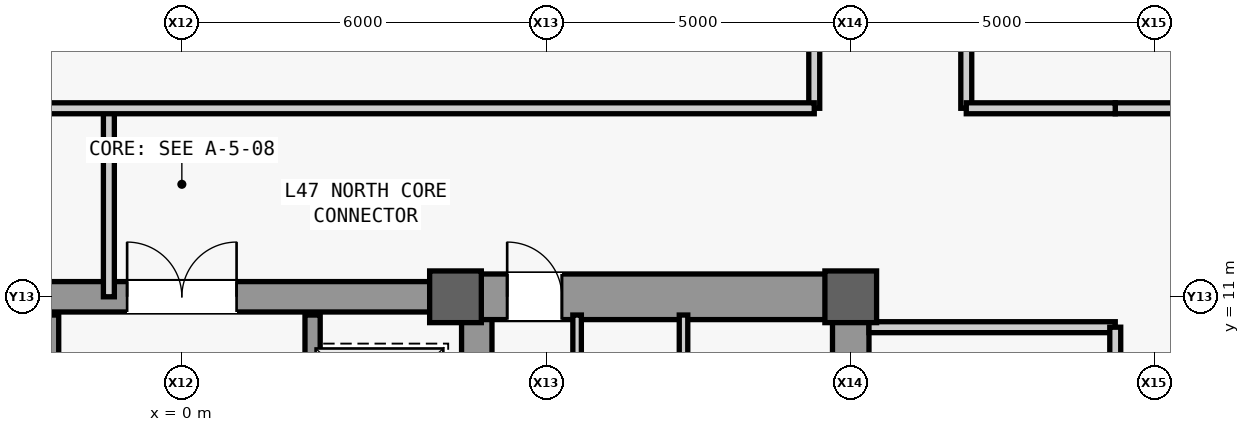
"""IFC4 building model, lengths in metres.
Left out: names, types, materials, properties, quantities, classifications, styles, units other than length and angle.
Written with IfcOpenShell. Run it as: python <this file> out.ifc"""

import sys

from ifc_helpers import new_model, si_unit, direction, frame, frame_2d, origin, origin_2d, place, context, subcontext, project, spatial, rectangle, extrude, source, transform, mapped, element, fill, save


model = new_model("IFC4")
c1 = context("Model", 3, precision=1e-05, world=origin(), true_north=direction((0.0, 1.0)))
c2 = subcontext(c1, "Body", "Model", "MODEL_VIEW")
j1 = project(units=[si_unit("LENGTHUNIT", "METRE"), si_unit("PLANEANGLEUNIT", "RADIAN")], contexts=[c1])
p1 = place(None, origin())
s1 = spatial("IfcSite", under=j1, at=p1, CompositionType="ELEMENT")
p2 = place(p1, origin())
s2 = spatial("IfcBuilding", under=s1, at=p2, CompositionType="ELEMENT")
p3 = place(p2, frame((0.0, 0.0, 203.1)))
s3 = spatial("IfcBuildingStorey", under=s2, at=p3, CompositionType="ELEMENT", Elevation=203.1)
m1 = source(origin(), c2, "Body", "SweptSolid", [
    extrude(rectangle(XDim=22.0, YDim=0.6, at=frame_2d((11.0, 0.0))), origin(), (0.0, 0.0, 1.0), 3.78),
])
p4 = place(p3, frame((11.0, -11.0, 0.0), z_axis=(0.0, 0.0, 1.0), x_axis=(0.0, 1.0, 0.0)))
e1 = element("IfcWall", 1, at=p4, inside=s3, PredefinedType="SHEAR", context=c2, shape_type="MappedRepresentation", body=[
    mapped(m1, transform((0.0, 0.0, 0.0), scale=1.0)),
])
m2 = source(origin(), c2, "Body", "SweptSolid", [
    extrude(rectangle(XDim=1.1, YDim=2.2, at=frame_2d((0.55, 1.1))), frame((0.0, 0.31, 0.0), z_axis=(0.0, -1.0, 0.0), x_axis=(1.0, 0.0, 0.0)), (0.0, 0.0, 1.0), 0.62),
])
p5 = place(p4, frame((0.8, 0.0, 0.0)))
e2 = element("IfcOpeningElement", 2, at=p5, cuts=e1, PredefinedType="OPENING", context=c2, shape_type="MappedRepresentation", body=[
    mapped(m2, transform((0.0, 0.0, 0.0), scale=1.0)),
])
m3 = source(origin(), c2, "Body", "SweptSolid", [
    extrude(rectangle(XDim=0.9, YDim=2.15, at=frame_2d((0.45, 1.075))), frame((0.0, 0.31, 0.0), z_axis=(0.0, -1.0, 0.0), x_axis=(1.0, 0.0, 0.0)), (0.0, 0.0, 1.0), 0.62),
])
p6 = place(p4, frame((7.575, 0.0, 0.0)))
e3 = element("IfcOpeningElement", 3, at=p6, cuts=e1, PredefinedType="OPENING", context=c2, shape_type="MappedRepresentation", body=[
    mapped(m3, transform((0.0, 0.0, 0.0), scale=1.0)),
])
m4 = source(origin(), c2, "Body", "SweptSolid", [
    extrude(rectangle(XDim=1.3, YDim=2.3, at=frame_2d((0.65, 1.15))), frame((0.0, 0.31, 0.0), z_axis=(0.0, -1.0, 0.0), x_axis=(1.0, 0.0, 0.0)), (0.0, 0.0, 1.0), 0.62),
])
p7 = place(p4, frame((2.7, 0.0, 0.0)))
e4 = element("IfcOpeningElement", 4, at=p7, cuts=e1, PredefinedType="OPENING", context=c2, shape_type="MappedRepresentation", body=[
    mapped(m4, transform((0.0, 0.0, 0.0), scale=1.0)),
])
p8 = place(p4, frame((13.35, 0.0, 0.0)))
e5 = element("IfcOpeningElement", 5, at=p8, cuts=e1, PredefinedType="OPENING", context=c2, shape_type="MappedRepresentation", body=[
    mapped(m4, transform((0.0, 0.0, 0.0), scale=1.0)),
])
m5 = source(origin(), c2, "Body", "SweptSolid", [
    extrude(rectangle(XDim=21.4, YDim=0.5, at=frame_2d((10.7, 0.0))), origin(), (0.0, 0.0, 1.0), 3.78),
])
p9 = place(p3, frame((4.85, -10.7, 0.0), z_axis=(0.0, 0.0, 1.0), x_axis=(0.0, 1.0, 0.0)))
e6 = element("IfcWall", 6, at=p9, inside=s3, PredefinedType="SHEAR", context=c2, shape_type="MappedRepresentation", body=[
    mapped(m5, transform((0.0, 0.0, 0.0), scale=1.0)),
])
m6 = source(origin(), c2, "Body", "SweptSolid", [
    extrude(rectangle(XDim=5.85, YDim=0.75, at=frame_2d((2.925, 0.0))), origin(), (0.0, 0.0, 1.0), 3.78),
])
p10 = place(p3, frame((4.85, 11.0, 0.0), z_axis=(0.0, 0.0, 1.0), x_axis=(1.0, 0.0, 0.0)))
e7 = element("IfcWall", 7, at=p10, inside=s3, PredefinedType="SHEAR", context=c2, shape_type="MappedRepresentation", body=[
    mapped(m6, transform((0.0, 0.0, 0.0), scale=1.0)),
])
m7 = source(origin(), c2, "Body", "SweptSolid", [
    extrude(rectangle(XDim=0.9, YDim=2.15, at=frame_2d((0.45, 1.075))), frame((0.0, 0.385, 0.0), z_axis=(0.0, -1.0, 0.0), x_axis=(1.0, 0.0, 0.0)), (0.0, 0.0, 1.0), 0.77),
])
p11 = place(p10, frame((0.5, 0.0, 0.0)))
e8 = element("IfcOpeningElement", 8, at=p11, cuts=e7, PredefinedType="OPENING", context=c2, shape_type="MappedRepresentation", body=[
    mapped(m7, transform((0.0, 0.0, 0.0), scale=1.0)),
])
m8 = source(origin(), c2, "Body", "SweptSolid", [
    extrude(rectangle(XDim=9.2, YDim=0.5, at=frame_2d((4.6, 0.0))), origin(), (0.0, 0.0, 1.0), 3.78),
])
p12 = place(p3, frame((-4.6, 11.0, 0.0), z_axis=(0.0, 0.0, 1.0), x_axis=(1.0, 0.0, 0.0)))
e9 = element("IfcWall", 9, at=p12, inside=s3, PredefinedType="SHEAR", context=c2, shape_type="MappedRepresentation", body=[
    mapped(m8, transform((0.0, 0.0, 0.0), scale=1.0)),
])
m9 = source(origin(), c2, "Body", "SweptSolid", [
    extrude(rectangle(XDim=1.8, YDim=2.25, at=frame_2d((0.9, 1.125))), frame((0.0, 0.26, 0.0), z_axis=(0.0, -1.0, 0.0), x_axis=(1.0, 0.0, 0.0)), (0.0, 0.0, 1.0), 0.52),
])
p13 = place(p12, frame((3.7, 0.0, 0.0)))
e10 = element("IfcOpeningElement", 10, at=p13, cuts=e9, PredefinedType="OPENING", context=c2, shape_type="MappedRepresentation", body=[
    mapped(m9, transform((0.0, 0.0, 0.0), scale=1.0)),
])
m10 = source(origin(), c2, "Body", "SweptSolid", [
    extrude(rectangle(XDim=0.85, YDim=0.85, at=origin_2d()), origin(), (0.0, 0.0, 1.0), 4.0),
])
for number, where, z_axis, x_axis in (
    (11, (4.5, 11.0, 0.0), (0.0, 0.0, 1.0), (1.0, 0.0, 0.0)),
    (12, (11.0, 11.0, 0.0), (0.0, 0.0, 1.0), (1.0, 0.0, 0.0)),
):
    element("IfcColumn", number, at=place(p3, frame(where, z_axis=z_axis, x_axis=x_axis)), inside=s3, PredefinedType="COLUMN", context=c2, shape_type="MappedRepresentation", body=[
        mapped(m10, transform((0.0, 0.0, 0.0), scale=1.0)),
    ])
m11 = source(origin(), c2, "Body", "SweptSolid", [
    extrude(rectangle(XDim=9.4, YDim=0.14, at=frame_2d((4.7, 0.0))), origin(), (0.0, 0.0, 1.0), 3.78),
])
p14 = place(p3, frame((8.25, 1.3, 0.0), z_axis=(0.0, 0.0, 1.0), x_axis=(0.0, 1.0, 0.0)))
e13 = element("IfcWall", 13, at=p14, inside=s3, PredefinedType="PARTITIONING", context=c2, shape_type="MappedRepresentation", body=[
    mapped(m11, transform((0.0, 0.0, 0.0), scale=1.0)),
])
m12 = source(origin(), c2, "Body", "SweptSolid", [
    extrude(rectangle(XDim=5.7, YDim=0.14, at=frame_2d((2.85, 0.0))), origin(), (0.0, 0.0, 1.0), 3.78),
])
p15 = place(p3, frame((6.5, 5.0, 0.0), z_axis=(0.0, 0.0, 1.0), x_axis=(0.0, 1.0, 0.0)))
e14 = element("IfcWall", 14, at=p15, inside=s3, PredefinedType="PARTITIONING", context=c2, shape_type="MappedRepresentation", body=[
    mapped(m12, transform((0.0, 0.0, 0.0), scale=1.0)),
])
m13 = source(origin(), c2, "Body", "SweptSolid", [
    extrude(rectangle(XDim=0.9, YDim=2.15, at=frame_2d((0.45, 1.075))), frame((0.0, 0.08, 0.0), z_axis=(0.0, -1.0, 0.0), x_axis=(1.0, 0.0, 0.0)), (0.0, 0.0, 1.0), 0.16),
])
p16 = place(p15, frame((2.05, 0.0, 0.0)))
e15 = element("IfcOpeningElement", 15, at=p16, cuts=e14, PredefinedType="OPENING", context=c2, shape_type="MappedRepresentation", body=[
    mapped(m13, transform((0.0, 0.0, 0.0), scale=1.0)),
])
m14 = source(origin(), c2, "Body", "SweptSolid", [
    extrude(rectangle(XDim=4.05, YDim=0.18, at=frame_2d((2.025, 0.0))), origin(), (0.0, 0.0, 1.0), 3.78),
])
p17 = place(p3, frame((11.3, 10.5, 0.0), z_axis=(0.0, 0.0, 1.0), x_axis=(1.0, 0.0, 0.0)))
e16 = element("IfcWall", 16, at=p17, inside=s3, PredefinedType="PARTITIONING", context=c2, shape_type="MappedRepresentation", body=[
    mapped(m14, transform((0.0, 0.0, 0.0), scale=1.0)),
])
m15 = source(origin(), c2, "Body", "SweptSolid", [
    extrude(rectangle(XDim=16.6, YDim=0.18, at=frame_2d((8.3, 0.0))), origin(), (0.0, 0.0, 1.0), 3.78),
])
p18 = place(p3, frame((15.35, -6.1, 0.0), z_axis=(0.0, 0.0, 1.0), x_axis=(0.0, 1.0, 0.0)))
e17 = element("IfcWall", 17, at=p18, inside=s3, PredefinedType="PARTITIONING", context=c2, shape_type="MappedRepresentation", body=[
    mapped(m15, transform((0.0, 0.0, 0.0), scale=1.0)),
])
m16 = source(origin(), c2, "Body", "SweptSolid", [
    extrude(rectangle(XDim=1.8, YDim=2.25, at=frame_2d((0.9, 1.125))), frame((0.0, 0.1, 0.0), z_axis=(0.0, -1.0, 0.0), x_axis=(1.0, 0.0, 0.0)), (0.0, 0.0, 1.0), 0.2),
])
p19 = place(p18, frame((2.7, 0.0, 0.0)))
e18 = element("IfcOpeningElement", 18, at=p19, cuts=e17, PredefinedType="OPENING", context=c2, shape_type="MappedRepresentation", body=[
    mapped(m16, transform((0.0, 0.0, 0.0), scale=1.0)),
])
p20 = place(p18, frame((13.0, 0.0, 0.0)))
e19 = element("IfcOpeningElement", 19, at=p20, cuts=e17, PredefinedType="OPENING", context=c2, shape_type="MappedRepresentation", body=[
    mapped(m16, transform((0.0, 0.0, 0.0), scale=1.0)),
])
m17 = source(origin(), c2, "Body", "SweptSolid", [
    extrude(rectangle(XDim=5.4, YDim=0.25, at=frame_2d((2.7, 0.0))), origin(), (0.0, 0.0, 1.0), 3.78),
])
p21 = place(p3, frame((-2.15, 5.3, 0.0), z_axis=(0.0, 0.0, 1.0), x_axis=(0.0, 1.0, 0.0)))
e20 = element("IfcWall", 20, at=p21, inside=s3, PredefinedType="SHEAR", context=c2, shape_type="MappedRepresentation", body=[
    mapped(m17, transform((0.0, 0.0, 0.0), scale=1.0)),
])
m18 = source(origin(), c2, "Body", "SweptSolid", [
    extrude(rectangle(XDim=1.2, YDim=2.3, at=frame_2d((0.6, 1.15))), frame((0.0, 0.135, 0.0), z_axis=(0.0, -1.0, 0.0), x_axis=(1.0, 0.0, 0.0)), (0.0, 0.0, 1.0), 0.27),
])
p22 = place(p21, frame((3.3, 0.0, 0.0)))
e21 = element("IfcOpeningElement", 21, at=p22, cuts=e20, PredefinedType="OPENING", context=c2, shape_type="MappedRepresentation", body=[
    mapped(m18, transform((0.0, 0.0, 0.0), scale=1.0)),
])
p23 = place(p21, frame((0.9, 0.0, 0.0)))
e22 = element("IfcOpeningElement", 22, at=p23, cuts=e20, PredefinedType="OPENING", context=c2, shape_type="MappedRepresentation", body=[
    mapped(m18, transform((0.0, 0.0, 0.0), scale=1.0)),
])
p24 = place(p3, frame((2.15, 5.3, 0.0), z_axis=(0.0, 0.0, 1.0), x_axis=(0.0, 1.0, 0.0)))
e23 = element("IfcWall", 23, at=p24, inside=s3, PredefinedType="SHEAR", context=c2, shape_type="MappedRepresentation", body=[
    mapped(m17, transform((0.0, 0.0, 0.0), scale=1.0)),
])
p25 = place(p24, frame((3.3, 0.0, 0.0)))
e24 = element("IfcOpeningElement", 24, at=p25, cuts=e23, PredefinedType="OPENING", context=c2, shape_type="MappedRepresentation", body=[
    mapped(m18, transform((0.0, 0.0, 0.0), scale=1.0)),
])
p26 = place(p24, frame((0.9, 0.0, 0.0)))
e25 = element("IfcOpeningElement", 25, at=p26, cuts=e23, PredefinedType="OPENING", context=c2, shape_type="MappedRepresentation", body=[
    mapped(m18, transform((0.0, 0.0, 0.0), scale=1.0)),
])
m19 = source(origin(), c2, "Body", "SweptSolid", [
    extrude(rectangle(XDim=2.45, YDim=0.18, at=frame_2d((1.225, 0.0))), origin(), (0.0, 0.0, 1.0), 3.78),
])
p27 = place(p3, frame((15.35, 14.1, 0.0), z_axis=(0.0, 0.0, 1.0), x_axis=(1.0, 0.0, 0.0)))
e26 = element("IfcWall", 26, at=p27, inside=s3, PredefinedType="PARTITIONING", context=c2, shape_type="MappedRepresentation", body=[
    mapped(m19, transform((0.0, 0.0, 0.0), scale=1.0)),
])
m20 = source(origin(), c2, "Body", "SweptSolid", [
    extrude(rectangle(XDim=3.1, YDim=0.18, at=frame_2d((1.55, 0.0))), origin(), (0.0, 0.0, 1.0), 3.78),
])
p28 = place(p3, frame((-1.2, 11.0, 0.0), z_axis=(0.0, 0.0, 1.0), x_axis=(0.0, 1.0, 0.0)))
e27 = element("IfcWall", 27, at=p28, inside=s3, PredefinedType="PARTITIONING", context=c2, shape_type="MappedRepresentation", body=[
    mapped(m20, transform((0.0, 0.0, 0.0), scale=1.0)),
])
m21 = source(origin(), c2, "Body", "SweptSolid", [
    extrude(rectangle(XDim=15.9, YDim=0.18, at=frame_2d((7.95, 0.0))), origin(), (0.0, 0.0, 1.0), 3.78),
])
p29 = place(p3, frame((10.4, 14.1, 0.0), z_axis=(0.0, 0.0, 1.0), x_axis=(0.0, 1.0, 0.0)))
e28 = element("IfcWall", 28, at=p29, inside=s3, PredefinedType="PARTITIONING", context=c2, shape_type="MappedRepresentation", body=[
    mapped(m21, transform((0.0, 0.0, 0.0), scale=1.0)),
])
m22 = source(origin(), c2, "Body", "SweptSolid", [
    extrude(rectangle(XDim=1.05, YDim=2.2, at=frame_2d((0.525, 1.1))), frame((0.0, 0.1, 0.0), z_axis=(0.0, -1.0, 0.0), x_axis=(1.0, 0.0, 0.0)), (0.0, 0.0, 1.0), 0.2),
])
p30 = place(p29, frame((11.4, 0.0, 0.0)))
e29 = element("IfcOpeningElement", 29, at=p30, cuts=e28, PredefinedType="OPENING", context=c2, shape_type="MappedRepresentation", body=[
    mapped(m22, transform((0.0, 0.0, 0.0), scale=1.0)),
])
m23 = source(origin(), c2, "Body", "SweptSolid", [
    extrude(rectangle(XDim=25.75, YDim=0.18, at=frame_2d((12.875, 0.0))), origin(), (0.0, 0.0, 1.0), 3.78),
])
p31 = place(p3, frame((-15.35, 14.1, 0.0), z_axis=(0.0, 0.0, 1.0), x_axis=(1.0, 0.0, 0.0)))
e30 = element("IfcWall", 30, at=p31, inside=s3, PredefinedType="PARTITIONING", context=c2, shape_type="MappedRepresentation", body=[
    mapped(m23, transform((0.0, 0.0, 0.0), scale=1.0)),
])
p32 = place(p3, frame((12.9, 14.1, 0.0), z_axis=(0.0, 0.0, 1.0), x_axis=(0.0, 1.0, 0.0)))
e31 = element("IfcWall", 31, at=p32, inside=s3, PredefinedType="PARTITIONING", context=c2, shape_type="MappedRepresentation", body=[
    mapped(m21, transform((0.0, 0.0, 0.0), scale=1.0)),
])
p33 = place(p32, frame((11.4, 0.0, 0.0)))
e32 = element("IfcOpeningElement", 32, at=p33, cuts=e31, PredefinedType="OPENING", context=c2, shape_type="MappedRepresentation", body=[
    mapped(m22, transform((0.0, 0.0, 0.0), scale=1.0)),
])
m24 = source(origin(), c2, "Body", "SweptSolid", [
    extrude(rectangle(XDim=2.45, YDim=0.18, at=frame_2d((1.225, 0.0))), origin(), (0.0, 0.0, 1.0), 3.78),
])
p34 = place(p3, frame((12.9, 14.1, 0.0), z_axis=(0.0, 0.0, 1.0), x_axis=(1.0, 0.0, 0.0)))
e33 = element("IfcWall", 33, at=p34, inside=s3, PredefinedType="PARTITIONING", context=c2, shape_type="MappedRepresentation", body=[
    mapped(m24, transform((0.0, 0.0, 0.0), scale=1.0)),
])
m25 = source(origin(), c2, "Body", "SweptSolid", [
    extrude(rectangle(XDim=0.9, YDim=2.15, at=frame_2d((0.45, 1.075))), frame((0.0, 0.025, 0.0), z_axis=(0.0, -1.0, 0.0), x_axis=(1.0, 0.0, 0.0)), (0.0, 0.0, 1.0), 0.05),
])
p35 = place(p11, origin())
e34 = element("IfcDoor", 34, at=p35, inside=s3, OperationType="SINGLE_SWING_LEFT", PredefinedType="DOOR", context=c2, shape_type="MappedRepresentation", body=[
    mapped(m25, transform((0.0, 0.0, 0.0), scale=1.0)),
])
fill(e8, e34)
m26 = source(origin(), c2, "Body", "SweptSolid", [
    extrude(rectangle(XDim=1.8, YDim=2.25, at=frame_2d((0.9, 1.125))), frame((0.0, 0.025, 0.0), z_axis=(0.0, -1.0, 0.0), x_axis=(1.0, 0.0, 0.0)), (0.0, 0.0, 1.0), 0.05),
])
p36 = place(p13, origin())
e35 = element("IfcDoor", 35, at=p36, inside=s3, OperationType="SINGLE_SWING_RIGHT", PredefinedType="DOOR", context=c2, shape_type="MappedRepresentation", body=[
    mapped(m26, transform((0.0, 0.0, 0.0), scale=1.0)),
])
fill(e10, e35)
save(model, sys.argv[1])
